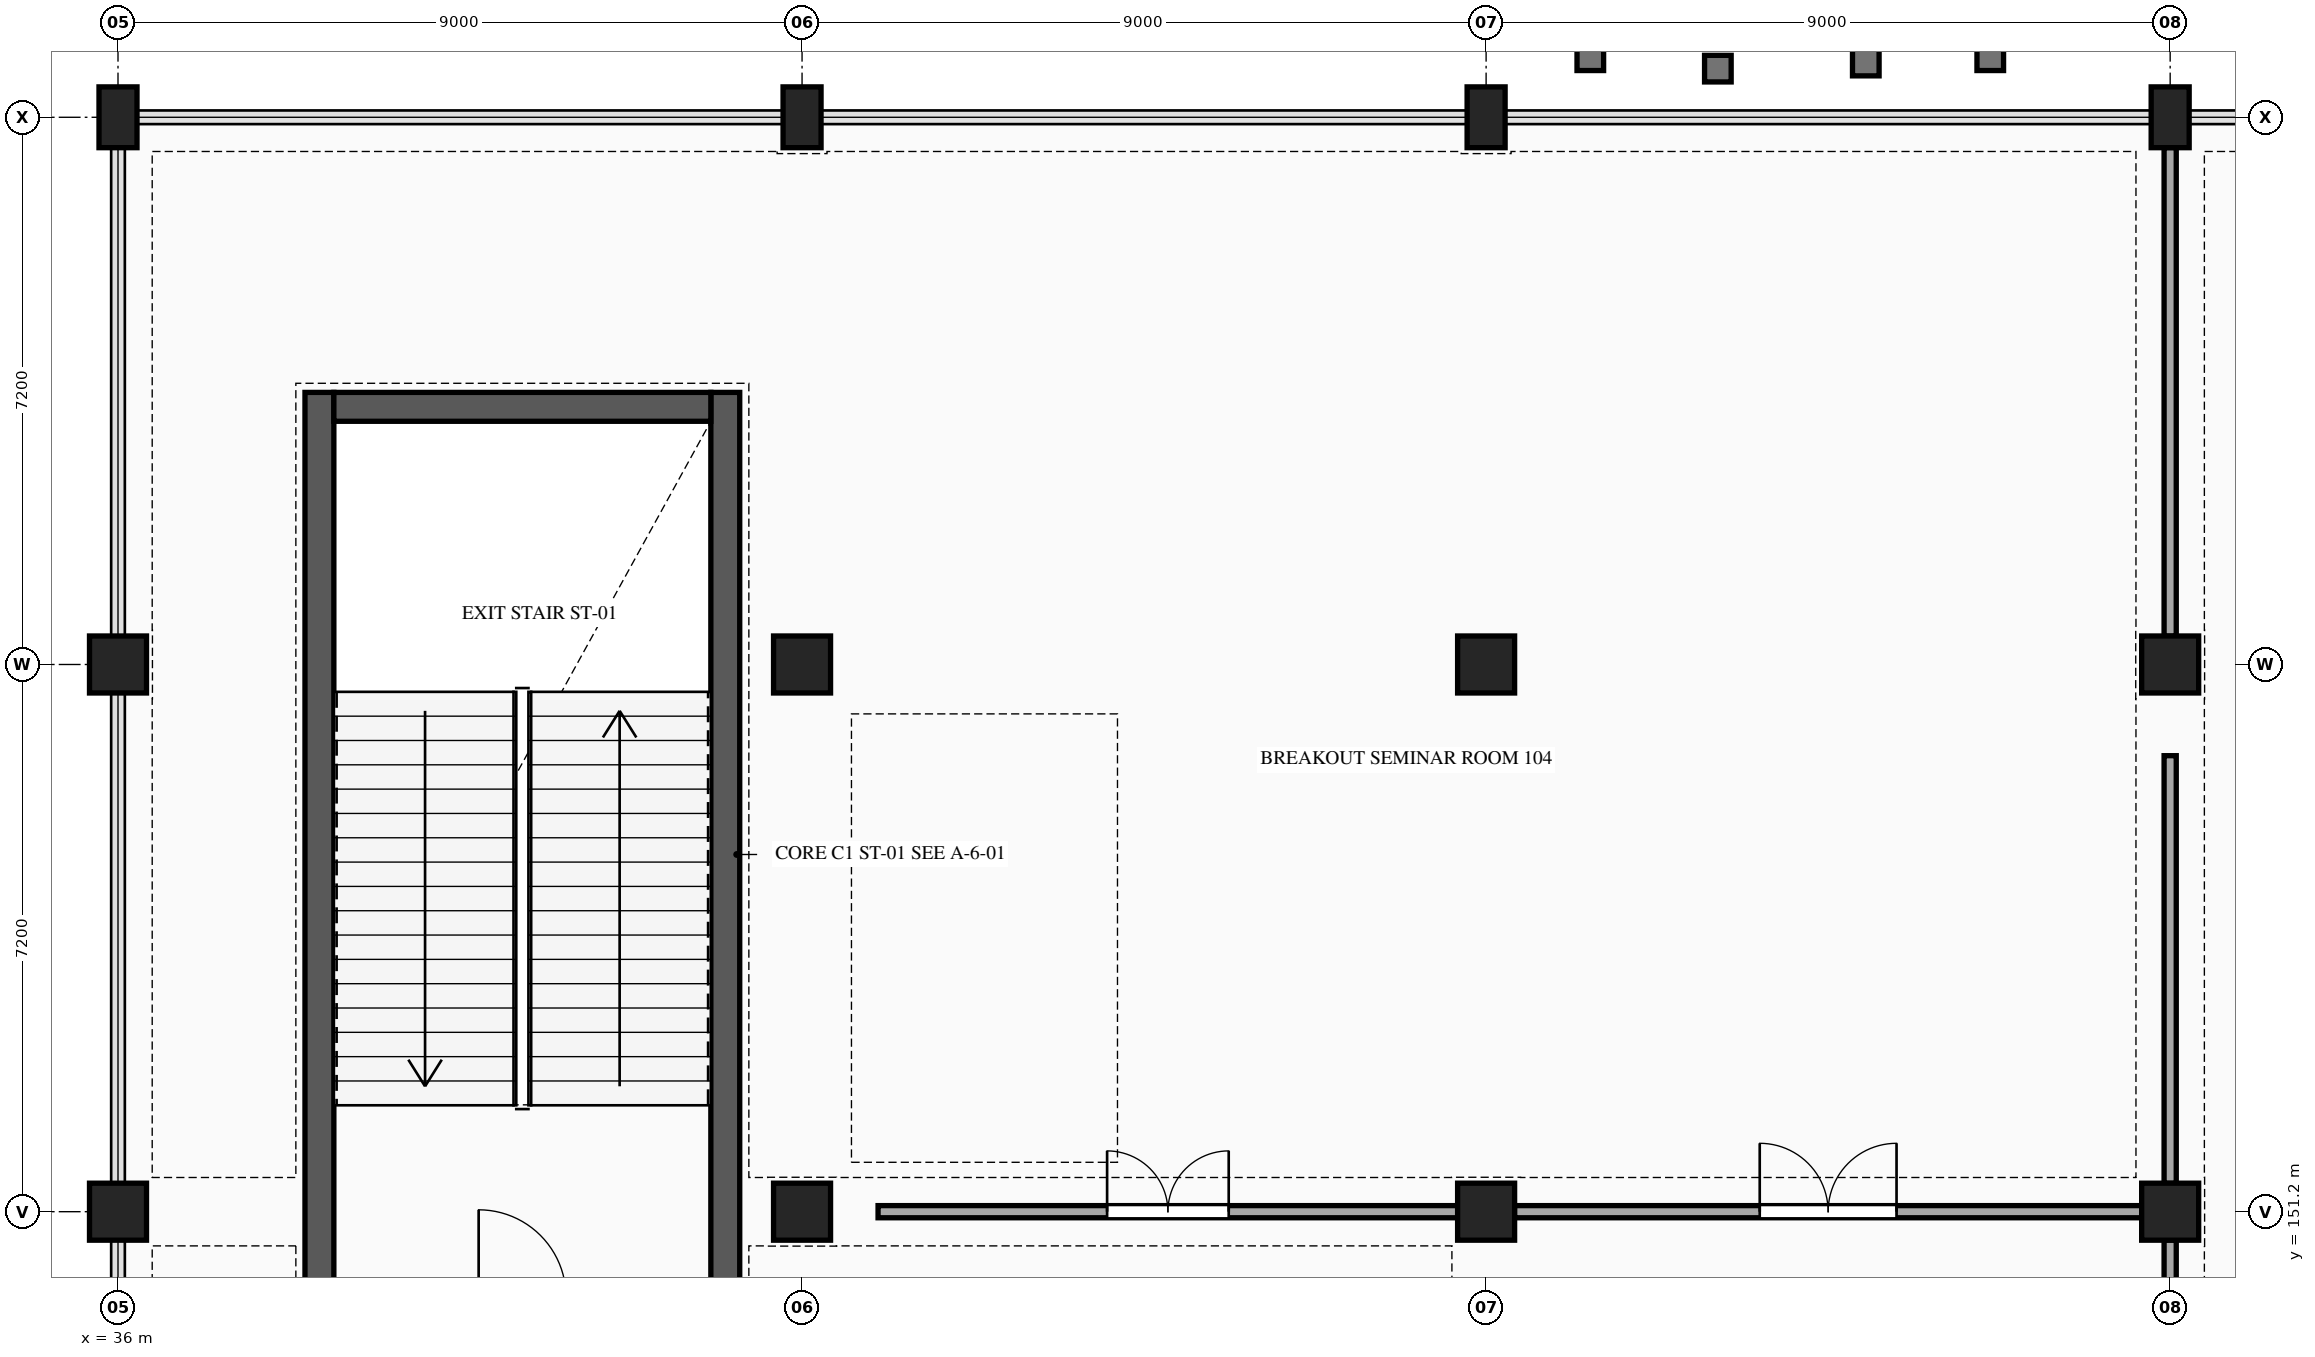
"""IFC4 building model, lengths in metres.
Left out: names, types, materials, properties, quantities, classifications, styles, units other than length and angle.
Written with IfcOpenShell. Run it as: python <this file> out.ifc"""

import sys

from ifc_helpers import new_model, si_unit, direction, frame, frame_2d, origin, origin_2d, place, context, subcontext, project, spatial, rectangle, extrude, element, fill, save


model = new_model("IFC4")
c1 = context("Model", 3, precision=1e-05, world=origin(), true_north=direction((0.0, 1.0)))
c2 = subcontext(c1, "Body", "Model", "MODEL_VIEW")
j1 = project(units=[si_unit("LENGTHUNIT", "METRE"), si_unit("PLANEANGLEUNIT", "RADIAN")], contexts=[c1])
p1 = place(None, origin())
s1 = spatial("IfcSite", under=j1, at=p1, CompositionType="ELEMENT")
p2 = place(p1, origin())
s2 = spatial("IfcBuilding", under=s1, at=p2, CompositionType="ELEMENT")
p3 = place(p2, frame((0.0, 0.0, 5.4)))
s3 = spatial("IfcBuildingStorey", under=s2, at=p3, CompositionType="ELEMENT", Elevation=5.4)
for number, where, z_axis, x_axis in (
    (1, (36.0, 151.2, 0.0), (0.0, 0.0, 1.0), (1.0, 0.0, 0.0)),
    (2, (36.0, 158.4, 0.0), (0.0, 0.0, 1.0), (1.0, 0.0, 0.0)),
):
    element("IfcColumn", number, at=place(p3, frame(where, z_axis=z_axis, x_axis=x_axis)), inside=s3, PredefinedType="COLUMN", context=c2, shape_type="SweptSolid", body=[
        extrude(rectangle(XDim=0.75, YDim=0.75, at=origin_2d()), origin(), (0.0, 0.0, 1.0), 5.4),
    ])
p4 = place(p3, frame((36.0, 165.6, 0.0), z_axis=(0.0, 0.0, 1.0), x_axis=(1.0, 0.0, 0.0)))
e3 = element("IfcColumn", 3, at=p4, inside=s3, PredefinedType="COLUMN", context=c2, shape_type="SweptSolid", body=[
    extrude(rectangle(XDim=0.5, YDim=0.8, at=origin_2d()), origin(), (0.0, 0.0, 1.0), 5.4),
])
for number, where, z_axis, x_axis in (
    (4, (45.0, 151.2, 0.0), (0.0, 0.0, 1.0), (1.0, 0.0, 0.0)),
    (5, (45.0, 158.4, 0.0), (0.0, 0.0, 1.0), (1.0, 0.0, 0.0)),
):
    element("IfcColumn", number, at=place(p3, frame(where, z_axis=z_axis, x_axis=x_axis)), inside=s3, PredefinedType="COLUMN", context=c2, shape_type="SweptSolid", body=[
        extrude(rectangle(XDim=0.75, YDim=0.75, at=origin_2d()), origin(), (0.0, 0.0, 1.0), 5.4),
    ])
p5 = place(p3, frame((45.0, 165.6, 0.0), z_axis=(0.0, 0.0, 1.0), x_axis=(1.0, 0.0, 0.0)))
e6 = element("IfcColumn", 6, at=p5, inside=s3, PredefinedType="COLUMN", context=c2, shape_type="SweptSolid", body=[
    extrude(rectangle(XDim=0.5, YDim=0.8, at=origin_2d()), origin(), (0.0, 0.0, 1.0), 5.4),
])
for number, where, z_axis, x_axis in (
    (7, (54.0, 151.2, 0.0), (0.0, 0.0, 1.0), (1.0, 0.0, 0.0)),
    (8, (54.0, 158.4, 0.0), (0.0, 0.0, 1.0), (1.0, 0.0, 0.0)),
):
    element("IfcColumn", number, at=place(p3, frame(where, z_axis=z_axis, x_axis=x_axis)), inside=s3, PredefinedType="COLUMN", context=c2, shape_type="SweptSolid", body=[
        extrude(rectangle(XDim=0.75, YDim=0.75, at=origin_2d()), origin(), (0.0, 0.0, 1.0), 5.4),
    ])
p6 = place(p3, frame((54.0, 165.6, 0.0), z_axis=(0.0, 0.0, 1.0), x_axis=(1.0, 0.0, 0.0)))
e9 = element("IfcColumn", 9, at=p6, inside=s3, PredefinedType="COLUMN", context=c2, shape_type="SweptSolid", body=[
    extrude(rectangle(XDim=0.5, YDim=0.8, at=origin_2d()), origin(), (0.0, 0.0, 1.0), 5.4),
])
for number, where, z_axis, x_axis in (
    (10, (63.0, 151.2, 0.0), (0.0, 0.0, 1.0), (1.0, 0.0, 0.0)),
    (11, (63.0, 158.4, 0.0), (0.0, 0.0, 1.0), (1.0, 0.0, 0.0)),
):
    element("IfcColumn", number, at=place(p3, frame(where, z_axis=z_axis, x_axis=x_axis)), inside=s3, PredefinedType="COLUMN", context=c2, shape_type="SweptSolid", body=[
        extrude(rectangle(XDim=0.75, YDim=0.75, at=origin_2d()), origin(), (0.0, 0.0, 1.0), 5.4),
    ])
p7 = place(p3, frame((63.0, 165.6, 0.0), z_axis=(0.0, 0.0, 1.0), x_axis=(1.0, 0.0, 0.0)))
e12 = element("IfcColumn", 12, at=p7, inside=s3, PredefinedType="COLUMN", context=c2, shape_type="SweptSolid", body=[
    extrude(rectangle(XDim=0.5, YDim=0.8, at=origin_2d()), origin(), (0.0, 0.0, 1.0), 5.4),
])
for number, where, z_axis, x_axis in (
    (13, (38.65, 149.95, 0.0), (0.0, 0.0, 1.0), (0.0, 1.0, 0.0)),
    (14, (43.99, 161.98, 0.0), (0.0, 0.0, 1.0), (0.0, -1.0, 0.0)),
):
    element("IfcWall", number, at=place(p3, frame(where, z_axis=z_axis, x_axis=x_axis)), inside=s3, PredefinedType="SHEAR", context=c2, shape_type="SweptSolid", body=[
        extrude(rectangle(XDim=12.03, YDim=0.38, at=frame_2d((6.015, 0.0))), origin(), (0.0, 0.0, 1.0), 5.12),
    ])
p8 = place(p3, frame((38.84, 161.79, 0.0), z_axis=(0.0, 0.0, 1.0), x_axis=(1.0, 0.0, 0.0)))
e15 = element("IfcWall", 15, at=p8, inside=s3, PredefinedType="SHEAR", context=c2, shape_type="SweptSolid", body=[
    extrude(rectangle(XDim=4.96, YDim=0.38, at=frame_2d((2.48, 0.0))), origin(), (0.0, 0.0, 1.0), 5.12),
])
p9 = place(p3, frame((46.0, 151.2, 0.0), z_axis=(0.0, 0.0, 1.0), x_axis=(1.0, 0.0, 0.0)))
e16 = element("IfcWall", 16, at=p9, inside=s3, PredefinedType="PARTITIONING", context=c2, shape_type="SweptSolid", body=[
    extrude(rectangle(XDim=7.627, YDim=0.16, at=frame_2d((3.813, 0.0))), origin(), (0.0, 0.0, 1.0), 4.498),
])
p10 = place(p9, frame((3.013, 0.0, 0.0)))
e17 = element("IfcOpeningElement", 17, at=p10, cuts=e16, PredefinedType="OPENING", context=c2, shape_type="SweptSolid", body=[
    extrude(rectangle(XDim=1.6, YDim=2.2, at=frame_2d((0.8, 1.1))), frame((0.0, 0.09, 0.0), z_axis=(0.0, -1.0, 0.0), x_axis=(1.0, 0.0, 0.0)), (0.0, 0.0, 1.0), 0.18),
])
p11 = place(p3, frame((54.373, 151.2, 0.0), z_axis=(0.0, 0.0, 1.0), x_axis=(1.0, 0.0, 0.0)))
e18 = element("IfcWall", 18, at=p11, inside=s3, PredefinedType="PARTITIONING", context=c2, shape_type="SweptSolid", body=[
    extrude(rectangle(XDim=8.254, YDim=0.16, at=frame_2d((4.127, 0.0))), origin(), (0.0, 0.0, 1.0), 4.498),
])
p12 = place(p11, frame((3.227, 0.0, 0.0)))
e19 = element("IfcOpeningElement", 19, at=p12, cuts=e18, PredefinedType="OPENING", context=c2, shape_type="SweptSolid", body=[
    extrude(rectangle(XDim=1.8, YDim=2.25, at=frame_2d((0.9, 1.125))), frame((0.0, 0.09, 0.0), z_axis=(0.0, -1.0, 0.0), x_axis=(1.0, 0.0, 0.0)), (0.0, 0.0, 1.0), 0.18),
])
p13 = place(p3, frame((63.0, 148.0, 0.0), z_axis=(0.0, 0.0, 1.0), x_axis=(0.0, 1.0, 0.0)))
e20 = element("IfcWall", 20, at=p13, inside=s3, PredefinedType="PARTITIONING", context=c2, shape_type="SweptSolid", body=[
    extrude(rectangle(XDim=2.827, YDim=0.16, at=frame_2d((1.414, 0.0))), origin(), (0.0, 0.0, 1.0), 4.508),
])
p14 = place(p3, frame((63.0, 151.573, 0.0), z_axis=(0.0, 0.0, 1.0), x_axis=(0.0, 1.0, 0.0)))
e21 = element("IfcWall", 21, at=p14, inside=s3, PredefinedType="PARTITIONING", context=c2, shape_type="SweptSolid", body=[
    extrude(rectangle(XDim=5.627, YDim=0.16, at=frame_2d((2.813, 0.0))), origin(), (0.0, 0.0, 1.0), 4.508),
])
p15 = place(p3, frame((63.0, 158.773, 0.0), z_axis=(0.0, 0.0, 1.0), x_axis=(0.0, 1.0, 0.0)))
e22 = element("IfcWall", 22, at=p15, inside=s3, PredefinedType="PARTITIONING", context=c2, shape_type="SweptSolid", body=[
    extrude(rectangle(XDim=6.429, YDim=0.16, at=frame_2d((3.214, 0.0))), origin(), (0.0, 0.0, 1.0), 4.508),
])
p16 = place(p10, origin())
e23 = element("IfcDoor", 23, at=p16, inside=s3, OperationType="DOUBLE_DOOR_SINGLE_SWING", PredefinedType="DOOR", context=c2, shape_type="SweptSolid", body=[
    extrude(rectangle(XDim=1.6, YDim=2.2, at=frame_2d((0.8, 1.1))), frame((0.0, 0.025, 0.0), z_axis=(0.0, -1.0, 0.0), x_axis=(1.0, 0.0, 0.0)), (0.0, 0.0, 1.0), 0.05),
])
fill(e17, e23)
p17 = place(p12, origin())
e24 = element("IfcDoor", 24, at=p17, inside=s3, OperationType="DOUBLE_DOOR_SINGLE_SWING", PredefinedType="DOOR", context=c2, shape_type="SweptSolid", body=[
    extrude(rectangle(XDim=1.8, YDim=2.25, at=frame_2d((0.9, 1.125))), frame((0.0, 0.025, 0.0), z_axis=(0.0, -1.0, 0.0), x_axis=(1.0, 0.0, 0.0)), (0.0, 0.0, 1.0), 0.05),
])
fill(e19, e24)
save(model, sys.argv[1])
